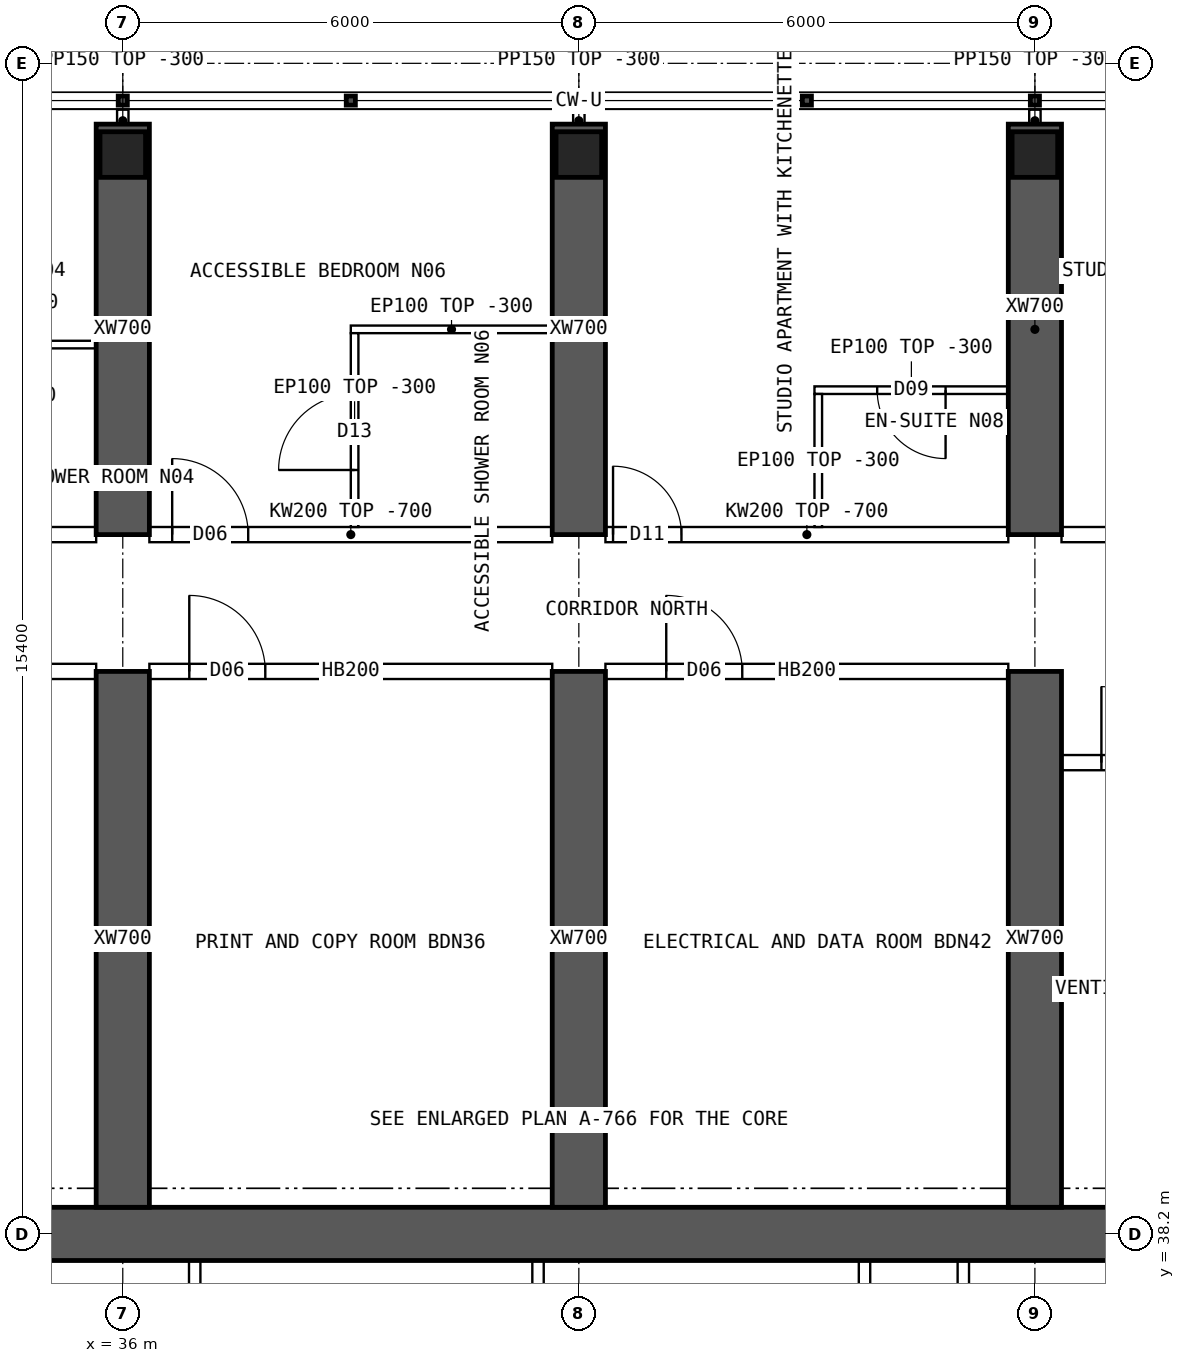
"""IFC4 building model, lengths in metres.
Left out: names, types, materials, properties, quantities, classifications, styles, units other than length and angle.
Written with IfcOpenShell. Run it as: python <this file> out.ifc"""

import sys

from ifc_helpers import new_model, si_unit, direction, frame, frame_2d, origin, origin_2d, place, context, subcontext, project, spatial, polyline, rectangle, hollow_rectangle, outline, extrude, element, fill, save


model = new_model("IFC4")
c1 = context("Model", 3, precision=1e-05, world=origin(), true_north=direction((0.0, 1.0)))
c2 = subcontext(c1, "Body", "Model", "MODEL_VIEW")
j1 = project(units=[si_unit("LENGTHUNIT", "METRE"), si_unit("PLANEANGLEUNIT", "RADIAN")], contexts=[c1])
p1 = place(None, origin())
s1 = spatial("IfcSite", under=j1, at=p1, CompositionType="ELEMENT")
p2 = place(p1, origin())
s2 = spatial("IfcBuilding", under=s1, at=p2, CompositionType="ELEMENT")
p3 = place(p2, frame((0.0, 0.0, 254.05)))
s3 = spatial("IfcBuildingStorey", under=s2, at=p3, CompositionType="ELEMENT", Elevation=254.05)
for number, where, z_axis, x_axis in (
    (1, (36.0, 52.4, 0.0), (0.0, 0.0, 1.0), (1.0, 0.0, 0.0)),
    (2, (42.0, 52.4, 0.0), (0.0, 0.0, 1.0), (1.0, 0.0, 0.0)),
    (3, (48.0, 52.4, 0.0), (0.0, 0.0, 1.0), (1.0, 0.0, 0.0)),
):
    element("IfcColumn", number, at=place(p3, frame(where, z_axis=z_axis, x_axis=x_axis)), inside=s3, PredefinedType="COLUMN", context=c2, shape_type="SweptSolid", body=[
        extrude(hollow_rectangle(XDim=0.6, YDim=0.6, WallThickness=0.06, at=origin_2d()), origin(), (0.0, 0.0, 1.0), 3.75),
    ])
p4 = place(p3, frame((18.0, 38.2, 0.0), z_axis=(0.0, 0.0, 1.0), x_axis=(1.0, 0.0, 0.0)))
e4 = element("IfcWall", 4, at=p4, inside=s3, PredefinedType="SHEAR", context=c2, shape_type="SweptSolid", body=[
    extrude(rectangle(XDim=48.0, YDim=0.7, at=frame_2d((24.0, 0.0))), origin(), (0.0, 0.0, 1.0), 3.75),
])
p5 = place(p3, frame((36.0, 47.4, 0.0), z_axis=(0.0, 0.0, 1.0), x_axis=(0.0, 1.0, 0.0)))
e5 = element("IfcWall", 5, at=p5, inside=s3, PredefinedType="SHEAR", context=c2, shape_type="SweptSolid", body=[
    extrude(rectangle(XDim=5.4, YDim=0.7, at=frame_2d((2.7, 0.0))), origin(), (0.0, 0.0, 1.0), 3.75),
])
p6 = place(p3, frame((36.0, 38.55, 0.0), z_axis=(0.0, 0.0, 1.0), x_axis=(0.0, 1.0, 0.0)))
e6 = element("IfcWall", 6, at=p6, inside=s3, PredefinedType="SHEAR", context=c2, shape_type="SweptSolid", body=[
    extrude(rectangle(XDim=7.05, YDim=0.7, at=frame_2d((3.525, 0.0))), origin(), (0.0, 0.0, 1.0), 3.75),
])
p7 = place(p3, frame((42.0, 47.4, 0.0), z_axis=(0.0, 0.0, 1.0), x_axis=(0.0, 1.0, 0.0)))
e7 = element("IfcWall", 7, at=p7, inside=s3, PredefinedType="SHEAR", context=c2, shape_type="SweptSolid", body=[
    extrude(rectangle(XDim=5.4, YDim=0.7, at=frame_2d((2.7, 0.0))), origin(), (0.0, 0.0, 1.0), 3.75),
])
p8 = place(p3, frame((42.0, 38.55, 0.0), z_axis=(0.0, 0.0, 1.0), x_axis=(0.0, 1.0, 0.0)))
e8 = element("IfcWall", 8, at=p8, inside=s3, PredefinedType="SHEAR", context=c2, shape_type="SweptSolid", body=[
    extrude(rectangle(XDim=7.05, YDim=0.7, at=frame_2d((3.525, 0.0))), origin(), (0.0, 0.0, 1.0), 3.75),
])
p9 = place(p3, frame((48.0, 47.4, 0.0), z_axis=(0.0, 0.0, 1.0), x_axis=(0.0, 1.0, 0.0)))
e9 = element("IfcWall", 9, at=p9, inside=s3, PredefinedType="SHEAR", context=c2, shape_type="SweptSolid", body=[
    extrude(rectangle(XDim=5.4, YDim=0.7, at=frame_2d((2.7, 0.0))), origin(), (0.0, 0.0, 1.0), 3.75),
])
p10 = place(p3, frame((48.0, 38.55, 0.0), z_axis=(0.0, 0.0, 1.0), x_axis=(0.0, 1.0, 0.0)))
e10 = element("IfcWall", 10, at=p10, inside=s3, PredefinedType="SHEAR", context=c2, shape_type="SweptSolid", body=[
    extrude(rectangle(XDim=7.05, YDim=0.7, at=frame_2d((3.525, 0.0))), origin(), (0.0, 0.0, 1.0), 3.75),
])
for number, where, z_axis, x_axis in (
    (11, (36.946, 34.75, 0.0), (0.0, 0.0, 1.0), (0.0, 1.0, 0.0)),
    (12, (41.463, 34.75, 0.0), (0.0, 0.0, 1.0), (0.0, 1.0, 0.0)),
    (13, (45.758, 34.75, 0.0), (0.0, 0.0, 1.0), (0.0, 1.0, 0.0)),
    (14, (47.058, 34.75, 0.0), (0.0, 0.0, 1.0), (0.0, 1.0, 0.0)),
):
    element("IfcWall", number, at=place(p3, frame(where, z_axis=z_axis, x_axis=x_axis)), inside=s3, PredefinedType="SOLIDWALL", context=c2, shape_type="SweptSolid", body=[
        extrude(rectangle(XDim=3.1, YDim=0.15, at=frame_2d((1.55, 0.0))), origin(), (0.0, 0.0, 1.0), 3.45),
    ])
p11 = place(p3, frame((30.35, 47.4, 0.0), z_axis=(0.0, 0.0, 1.0), x_axis=(1.0, 0.0, 0.0)))
e15 = element("IfcWall", 15, at=p11, inside=s3, PredefinedType="SOLIDWALL", context=c2, shape_type="SweptSolid", body=[
    extrude(outline(polyline([(0.0, 0.0), (5.3, 0.0), (5.3, 3.05), (0.0, 3.05), (0.0, 0.0)])), frame((0.0, 0.1, 0.0), z_axis=(0.0, -1.0, 0.0), x_axis=(1.0, 0.0, 0.0)), (0.0, 0.0, 1.0), 0.2),
])
p12 = place(p11, frame((2.3, 0.0, 0.0)))
e16 = element("IfcOpeningElement", 16, at=p12, cuts=e15, PredefinedType="OPENING", context=c2, shape_type="SweptSolid", body=[
    extrude(rectangle(XDim=0.9, YDim=2.1, at=frame_2d((0.45, 1.05))), frame((0.0, 0.11, 0.0), z_axis=(0.0, -1.0, 0.0), x_axis=(1.0, 0.0, 0.0)), (0.0, 0.0, 1.0), 0.22),
])
p13 = place(p3, frame((30.35, 45.6, 0.0), z_axis=(0.0, 0.0, 1.0), x_axis=(1.0, 0.0, 0.0)))
e17 = element("IfcWall", 17, at=p13, inside=s3, PredefinedType="SOLIDWALL", context=c2, shape_type="SweptSolid", body=[
    extrude(rectangle(XDim=5.3, YDim=0.2, at=frame_2d((2.65, 0.0))), origin(), (0.0, 0.0, 1.0), 3.45),
])
p14 = place(p13, frame((0.8, 0.0, 0.0)))
e18 = element("IfcOpeningElement", 18, at=p14, cuts=e17, PredefinedType="OPENING", context=c2, shape_type="SweptSolid", body=[
    extrude(rectangle(XDim=1.0, YDim=2.1, at=frame_2d((0.5, 1.05))), frame((0.0, 0.11, 0.0), z_axis=(0.0, -1.0, 0.0), x_axis=(1.0, 0.0, 0.0)), (0.0, 0.0, 1.0), 0.22),
])
p15 = place(p3, frame((36.35, 47.4, 0.0), z_axis=(0.0, 0.0, 1.0), x_axis=(1.0, 0.0, 0.0)))
e19 = element("IfcWall", 19, at=p15, inside=s3, PredefinedType="SOLIDWALL", context=c2, shape_type="SweptSolid", body=[
    extrude(outline(polyline([(0.0, 0.0), (5.3, 0.0), (5.3, 3.05), (0.0, 3.05), (0.0, 0.0)])), frame((0.0, 0.1, 0.0), z_axis=(0.0, -1.0, 0.0), x_axis=(1.0, 0.0, 0.0)), (0.0, 0.0, 1.0), 0.2),
])
p16 = place(p15, frame((0.3, 0.0, 0.0)))
e20 = element("IfcOpeningElement", 20, at=p16, cuts=e19, PredefinedType="OPENING", context=c2, shape_type="SweptSolid", body=[
    extrude(rectangle(XDim=1.0, YDim=2.1, at=frame_2d((0.5, 1.05))), frame((0.0, 0.11, 0.0), z_axis=(0.0, -1.0, 0.0), x_axis=(1.0, 0.0, 0.0)), (0.0, 0.0, 1.0), 0.22),
])
p17 = place(p3, frame((36.35, 45.6, 0.0), z_axis=(0.0, 0.0, 1.0), x_axis=(1.0, 0.0, 0.0)))
e21 = element("IfcWall", 21, at=p17, inside=s3, PredefinedType="SOLIDWALL", context=c2, shape_type="SweptSolid", body=[
    extrude(rectangle(XDim=5.3, YDim=0.2, at=frame_2d((2.65, 0.0))), origin(), (0.0, 0.0, 1.0), 3.45),
])
p18 = place(p17, frame((0.525, 0.0, 0.0)))
e22 = element("IfcOpeningElement", 22, at=p18, cuts=e21, PredefinedType="OPENING", context=c2, shape_type="SweptSolid", body=[
    extrude(rectangle(XDim=1.0, YDim=2.1, at=frame_2d((0.5, 1.05))), frame((0.0, 0.11, 0.0), z_axis=(0.0, -1.0, 0.0), x_axis=(1.0, 0.0, 0.0)), (0.0, 0.0, 1.0), 0.22),
])
p19 = place(p3, frame((42.35, 47.4, 0.0), z_axis=(0.0, 0.0, 1.0), x_axis=(1.0, 0.0, 0.0)))
e23 = element("IfcWall", 23, at=p19, inside=s3, PredefinedType="SOLIDWALL", context=c2, shape_type="SweptSolid", body=[
    extrude(outline(polyline([(0.0, 0.0), (5.3, 0.0), (5.3, 3.05), (0.0, 3.05), (0.0, 0.0)])), frame((0.0, 0.1, 0.0), z_axis=(0.0, -1.0, 0.0), x_axis=(1.0, 0.0, 0.0)), (0.0, 0.0, 1.0), 0.2),
])
p20 = place(p19, frame((0.1, 0.0, 0.0)))
e24 = element("IfcOpeningElement", 24, at=p20, cuts=e23, PredefinedType="OPENING", context=c2, shape_type="SweptSolid", body=[
    extrude(rectangle(XDim=0.9, YDim=2.1, at=frame_2d((0.45, 1.05))), frame((0.0, 0.11, 0.0), z_axis=(0.0, -1.0, 0.0), x_axis=(1.0, 0.0, 0.0)), (0.0, 0.0, 1.0), 0.22),
])
p21 = place(p3, frame((42.35, 45.6, 0.0), z_axis=(0.0, 0.0, 1.0), x_axis=(1.0, 0.0, 0.0)))
e25 = element("IfcWall", 25, at=p21, inside=s3, PredefinedType="SOLIDWALL", context=c2, shape_type="SweptSolid", body=[
    extrude(rectangle(XDim=5.3, YDim=0.2, at=frame_2d((2.65, 0.0))), origin(), (0.0, 0.0, 1.0), 3.45),
])
p22 = place(p21, frame((0.8, 0.0, 0.0)))
e26 = element("IfcOpeningElement", 26, at=p22, cuts=e25, PredefinedType="OPENING", context=c2, shape_type="SweptSolid", body=[
    extrude(rectangle(XDim=1.0, YDim=2.1, at=frame_2d((0.5, 1.05))), frame((0.0, 0.11, 0.0), z_axis=(0.0, -1.0, 0.0), x_axis=(1.0, 0.0, 0.0)), (0.0, 0.0, 1.0), 0.22),
])
p23 = place(p3, frame((48.35, 47.4, 0.0), z_axis=(0.0, 0.0, 1.0), x_axis=(1.0, 0.0, 0.0)))
e27 = element("IfcWall", 27, at=p23, inside=s3, PredefinedType="SOLIDWALL", context=c2, shape_type="SweptSolid", body=[
    extrude(outline(polyline([(0.0, 0.0), (5.3, 0.0), (5.3, 3.05), (0.0, 3.05), (0.0, 0.0)])), frame((0.0, 0.1, 0.0), z_axis=(0.0, -1.0, 0.0), x_axis=(1.0, 0.0, 0.0)), (0.0, 0.0, 1.0), 0.2),
])
p24 = place(p23, frame((2.3, 0.0, 0.0)))
e28 = element("IfcOpeningElement", 28, at=p24, cuts=e27, PredefinedType="OPENING", context=c2, shape_type="SweptSolid", body=[
    extrude(rectangle(XDim=0.9, YDim=2.1, at=frame_2d((0.45, 1.05))), frame((0.0, 0.11, 0.0), z_axis=(0.0, -1.0, 0.0), x_axis=(1.0, 0.0, 0.0)), (0.0, 0.0, 1.0), 0.22),
])
p25 = place(p3, frame((32.5, 49.9, 0.0), z_axis=(0.0, 0.0, 1.0), x_axis=(1.0, 0.0, 0.0)))
e29 = element("IfcWall", 29, at=p25, inside=s3, PredefinedType="PARTITIONING", context=c2, shape_type="SweptSolid", body=[
    extrude(rectangle(XDim=3.15, YDim=0.1, at=frame_2d((1.575, 0.0))), origin(), (0.0, 0.0, 1.0), 3.45),
])
p26 = place(p25, frame((0.25, 0.0, 0.0)))
e30 = element("IfcOpeningElement", 30, at=p26, cuts=e29, PredefinedType="OPENING", context=c2, shape_type="SweptSolid", body=[
    extrude(rectangle(XDim=0.8, YDim=2.1, at=frame_2d((0.4, 1.05))), frame((0.0, 0.06, 0.0), z_axis=(0.0, -1.0, 0.0), x_axis=(1.0, 0.0, 0.0)), (0.0, 0.0, 1.0), 0.12),
])
p27 = place(p3, frame((39.0, 50.1, 0.0), z_axis=(0.0, 0.0, 1.0), x_axis=(1.0, 0.0, 0.0)))
e31 = element("IfcWall", 31, at=p27, inside=s3, PredefinedType="PARTITIONING", context=c2, shape_type="SweptSolid", body=[
    extrude(rectangle(XDim=2.65, YDim=0.1, at=frame_2d((1.325, 0.0))), origin(), (0.0, 0.0, 1.0), 3.45),
])
p28 = place(p3, frame((39.05, 50.05, 0.0), z_axis=(0.0, 0.0, 1.0), x_axis=(0.0, -1.0, 0.0)))
e32 = element("IfcWall", 32, at=p28, inside=s3, PredefinedType="PARTITIONING", context=c2, shape_type="SweptSolid", body=[
    extrude(outline(polyline([(0.0, 0.0), (2.55, 0.0), (2.55, 3.05), (2.502, 3.05), (2.5, 3.45), (0.0, 3.45), (0.0, 0.0)])), frame((0.0, 0.05, 0.0), z_axis=(0.0, -1.0, 0.0), x_axis=(1.0, 0.0, 0.0)), (0.0, 0.0, 1.0), 0.1),
])
p29 = place(p28, frame((0.8, 0.0, 0.0)))
e33 = element("IfcOpeningElement", 33, at=p29, cuts=e32, PredefinedType="OPENING", context=c2, shape_type="SweptSolid", body=[
    extrude(rectangle(XDim=1.0, YDim=2.1, at=frame_2d((0.5, 1.05))), frame((0.0, 0.06, 0.0), z_axis=(0.0, -1.0, 0.0), x_axis=(1.0, 0.0, 0.0)), (0.0, 0.0, 1.0), 0.12),
])
p30 = place(p3, frame((45.1, 49.3, 0.0), z_axis=(0.0, 0.0, 1.0), x_axis=(1.0, 0.0, 0.0)))
e34 = element("IfcWall", 34, at=p30, inside=s3, PredefinedType="PARTITIONING", context=c2, shape_type="SweptSolid", body=[
    extrude(rectangle(XDim=2.55, YDim=0.1, at=frame_2d((1.275, 0.0))), origin(), (0.0, 0.0, 1.0), 3.45),
])
p31 = place(p30, frame((0.825, 0.0, 0.0)))
e35 = element("IfcOpeningElement", 35, at=p31, cuts=e34, PredefinedType="OPENING", context=c2, shape_type="SweptSolid", body=[
    extrude(rectangle(XDim=0.9, YDim=2.1, at=frame_2d((0.45, 1.05))), frame((0.0, 0.06, 0.0), z_axis=(0.0, -1.0, 0.0), x_axis=(1.0, 0.0, 0.0)), (0.0, 0.0, 1.0), 0.12),
])
p32 = place(p3, frame((45.15, 49.25, 0.0), z_axis=(0.0, 0.0, 1.0), x_axis=(0.0, -1.0, 0.0)))
e36 = element("IfcWall", 36, at=p32, inside=s3, PredefinedType="PARTITIONING", context=c2, shape_type="SweptSolid", body=[
    extrude(outline(polyline([(0.0, 0.0), (1.75, 0.0), (1.75, 3.05), (1.702, 3.05), (1.7, 3.45), (0.0, 3.45), (0.0, 0.0)])), frame((0.0, 0.05, 0.0), z_axis=(0.0, -1.0, 0.0), x_axis=(1.0, 0.0, 0.0)), (0.0, 0.0, 1.0), 0.1),
])
p33 = place(p3, frame((48.35, 44.4, 0.0), z_axis=(0.0, 0.0, 1.0), x_axis=(1.0, 0.0, 0.0)))
e37 = element("IfcWall", 37, at=p33, inside=s3, PredefinedType="SOLIDWALL", context=c2, shape_type="SweptSolid", body=[
    extrude(rectangle(XDim=5.3, YDim=0.2, at=frame_2d((2.65, 0.0))), origin(), (0.0, 0.0, 1.0), 3.45),
])
p34 = place(p33, frame((0.525, 0.0, 0.0)))
e38 = element("IfcOpeningElement", 38, at=p34, cuts=e37, PredefinedType="OPENING", context=c2, shape_type="SweptSolid", body=[
    extrude(rectangle(XDim=1.0, YDim=2.1, at=frame_2d((0.5, 1.05))), frame((0.0, 0.11, 0.0), z_axis=(0.0, -1.0, 0.0), x_axis=(1.0, 0.0, 0.0)), (0.0, 0.0, 1.0), 0.22),
])
for number, where, z_axis, x_axis in (
    (39, (36.0, 52.7, 0.0), (0.0, 0.0, 1.0), (0.0, 1.0, 0.0)),
    (40, (42.0, 52.7, 0.0), (0.0, 0.0, 1.0), (0.0, 1.0, 0.0)),
    (41, (48.0, 52.7, 0.0), (0.0, 0.0, 1.0), (0.0, 1.0, 0.0)),
):
    element("IfcWall", number, at=place(p3, frame(where, z_axis=z_axis, x_axis=x_axis)), inside=s3, PredefinedType="PARTITIONING", context=c2, shape_type="SweptSolid", body=[
        extrude(rectangle(XDim=0.29, YDim=0.15, at=frame_2d((0.145, 0.0))), origin(), (0.0, 0.0, 1.0), 3.45),
    ])
p35 = place(p29, origin())
e42 = element("IfcDoor", 42, at=p35, inside=s3, OperationType="SINGLE_SWING_RIGHT", PredefinedType="DOOR", context=c2, shape_type="SweptSolid", body=[
    extrude(rectangle(XDim=1.0, YDim=2.1, at=frame_2d((0.5, 1.05))), frame((0.0, 0.025, 0.0), z_axis=(0.0, -1.0, 0.0), x_axis=(1.0, 0.0, 0.0)), (0.0, 0.0, 1.0), 0.05),
])
fill(e33, e42)
p36 = place(p16, origin())
e43 = element("IfcDoor", 43, at=p36, inside=s3, OperationType="SINGLE_SWING_LEFT", PredefinedType="DOOR", context=c2, shape_type="SweptSolid", body=[
    extrude(rectangle(XDim=1.0, YDim=2.1, at=frame_2d((0.5, 1.05))), frame((0.0, 0.025, 0.0), z_axis=(0.0, -1.0, 0.0), x_axis=(1.0, 0.0, 0.0)), (0.0, 0.0, 1.0), 0.05),
])
fill(e20, e43)
p37 = place(p31, origin())
e44 = element("IfcDoor", 44, at=p37, inside=s3, OperationType="SINGLE_SWING_RIGHT", PredefinedType="DOOR", context=c2, shape_type="SweptSolid", body=[
    extrude(rectangle(XDim=0.9, YDim=2.1, at=frame_2d((0.45, 1.05))), frame((0.0, 0.025, 0.0), z_axis=(0.0, -1.0, 0.0), x_axis=(1.0, 0.0, 0.0)), (0.0, 0.0, 1.0), 0.05),
])
fill(e35, e44)
p38 = place(p20, origin())
e45 = element("IfcDoor", 45, at=p38, inside=s3, OperationType="SINGLE_SWING_LEFT", PredefinedType="DOOR", context=c2, shape_type="SweptSolid", body=[
    extrude(rectangle(XDim=0.9, YDim=2.1, at=frame_2d((0.45, 1.05))), frame((0.0, 0.025, 0.0), z_axis=(0.0, -1.0, 0.0), x_axis=(1.0, 0.0, 0.0)), (0.0, 0.0, 1.0), 0.05),
])
fill(e24, e45)
p39 = place(p18, origin())
e46 = element("IfcDoor", 46, at=p39, inside=s3, OperationType="SINGLE_SWING_LEFT", PredefinedType="DOOR", context=c2, shape_type="SweptSolid", body=[
    extrude(rectangle(XDim=1.0, YDim=2.1, at=frame_2d((0.5, 1.05))), frame((0.0, 0.025, 0.0), z_axis=(0.0, -1.0, 0.0), x_axis=(1.0, 0.0, 0.0)), (0.0, 0.0, 1.0), 0.05),
])
fill(e22, e46)
p40 = place(p22, origin())
e47 = element("IfcDoor", 47, at=p40, inside=s3, OperationType="SINGLE_SWING_LEFT", PredefinedType="DOOR", context=c2, shape_type="SweptSolid", body=[
    extrude(rectangle(XDim=1.0, YDim=2.1, at=frame_2d((0.5, 1.05))), frame((0.0, 0.025, 0.0), z_axis=(0.0, -1.0, 0.0), x_axis=(1.0, 0.0, 0.0)), (0.0, 0.0, 1.0), 0.05),
])
fill(e26, e47)
p41 = place(p34, origin())
e48 = element("IfcDoor", 48, at=p41, inside=s3, OperationType="SINGLE_SWING_LEFT", PredefinedType="DOOR", context=c2, shape_type="SweptSolid", body=[
    extrude(rectangle(XDim=1.0, YDim=2.1, at=frame_2d((0.5, 1.05))), frame((0.0, 0.025, 0.0), z_axis=(0.0, -1.0, 0.0), x_axis=(1.0, 0.0, 0.0)), (0.0, 0.0, 1.0), 0.05),
])
fill(e38, e48)
save(model, sys.argv[1])
